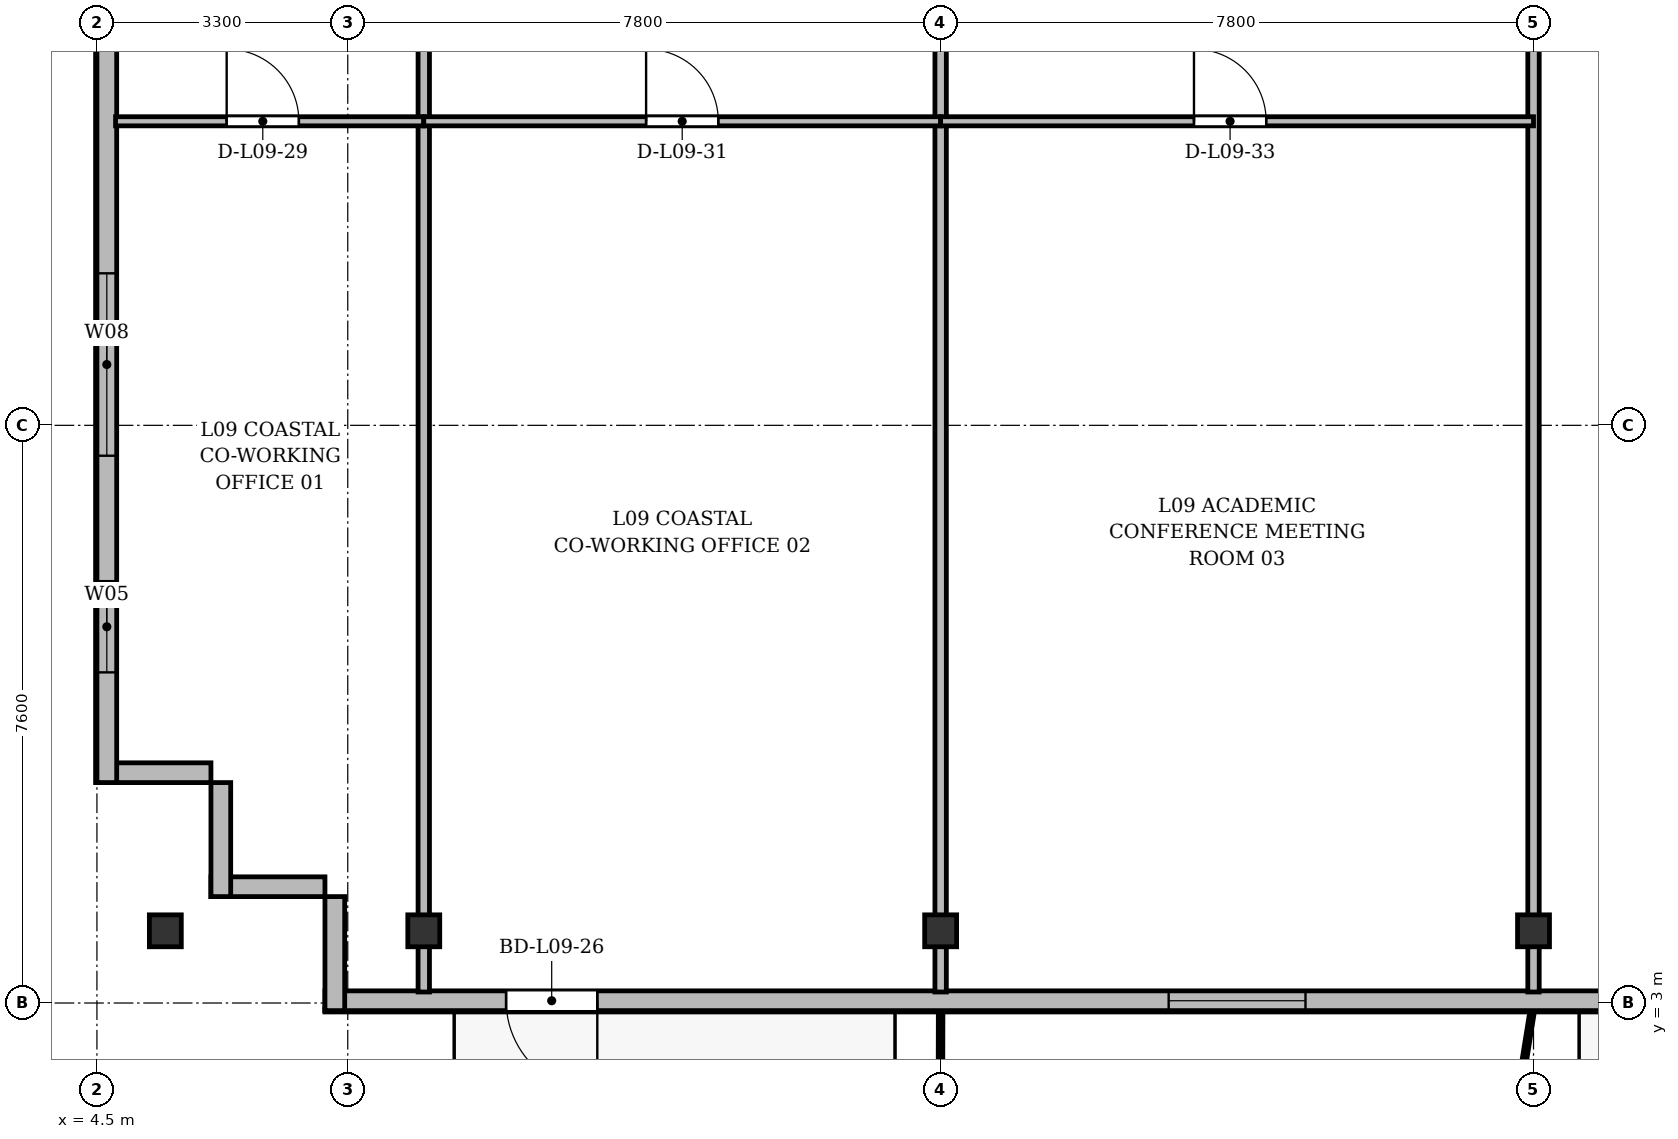
"""IFC4 building model, lengths in metres.
Left out: names, types, materials, properties, quantities, classifications, styles, units other than length and angle.
Written with IfcOpenShell. Run it as: python <this file> out.ifc"""

import sys

from ifc_helpers import new_model, si_unit, direction, frame, frame_2d, origin, origin_2d, place, context, subcontext, project, spatial, rectangle, i_section, extrude, source, transform, mapped, element, fill, save


model = new_model("IFC4")
c1 = context("Model", 3, precision=1e-05, world=origin(), true_north=direction((0.0, 1.0)))
c2 = subcontext(c1, "Body", "Model", "MODEL_VIEW")
j1 = project(units=[si_unit("LENGTHUNIT", "METRE"), si_unit("PLANEANGLEUNIT", "RADIAN")], contexts=[c1])
p1 = place(None, origin())
s1 = spatial("IfcSite", under=j1, at=p1, CompositionType="ELEMENT")
p2 = place(p1, origin())
s2 = spatial("IfcBuilding", under=s1, at=p2, CompositionType="ELEMENT")
p3 = place(p2, frame((0.0, 0.0, 37.9)))
s3 = spatial("IfcBuildingStorey", under=s2, at=p3, CompositionType="ELEMENT", Elevation=37.9)
m1 = source(origin(), c2, "Body", "SweptSolid", [
    extrude(i_section(OverallWidth=0.42, OverallDepth=0.42, WebThickness=0.026, FlangeThickness=0.04, at=origin_2d()), origin(), (0.0, 0.0, 1.0), 3.6),
])
for number, where, z_axis, x_axis in (
    (1, (5.4, 3.95, 0.0), (0.0, 0.0, 1.0), (1.0, 0.0, 0.0)),
    (2, (8.8, 3.95, 0.0), (0.0, 0.0, 1.0), (1.0, 0.0, 0.0)),
    (3, (15.6, 3.95, 0.0), (0.0, 0.0, 1.0), (1.0, 0.0, 0.0)),
    (4, (23.4, 3.95, 0.0), (0.0, 0.0, 1.0), (1.0, 0.0, 0.0)),
):
    element("IfcColumn", number, at=place(p3, frame(where, z_axis=z_axis, x_axis=x_axis)), inside=s3, PredefinedType="COLUMN", context=c2, shape_type="MappedRepresentation", body=[
        mapped(m1, transform((0.0, 0.0, 0.0), x_axis=(1.0, 0.0, 0.0), y_axis=(0.0, 1.0, 0.0), z_axis=(0.0, 0.0, 1.0), scale=1.0)),
    ])
for number, where, z_axis, x_axis in (
    (5, (7.5, 4.53, 0.0), (0.0, 0.0, 1.0), (-1.0, 0.0, 0.0)),
    (6, (6.13, 4.4, 0.0), (0.0, 0.0, 1.0), (0.0, 1.0, 0.0)),
):
    element("IfcWall", number, at=place(p3, frame(where, z_axis=z_axis, x_axis=x_axis)), inside=s3, PredefinedType="SOLIDWALL", context=c2, shape_type="SweptSolid", body=[
        extrude(rectangle(XDim=1.5, YDim=0.26, at=frame_2d((0.75, 0.0))), origin(), (0.0, 0.0, 1.0), 3.34),
    ])
p4 = place(p3, frame((6.0, 6.03, 0.0), z_axis=(0.0, 0.0, 1.0), x_axis=(-1.0, 0.0, 0.0)))
e7 = element("IfcWall", 7, at=p4, inside=s3, PredefinedType="SOLIDWALL", context=c2, shape_type="SweptSolid", body=[
    extrude(rectangle(XDim=1.5, YDim=0.26, at=frame_2d((0.75, 0.0))), origin(), (0.0, 0.0, 1.0), 2.752),
])
p5 = place(p3, frame((4.63, 5.9, 0.0), z_axis=(0.0, 0.0, 1.0), x_axis=(0.0, 1.0, 0.0)))
e8 = element("IfcWall", 8, at=p5, inside=s3, PredefinedType="SOLIDWALL", context=c2, shape_type="SweptSolid", body=[
    extrude(rectangle(XDim=39.6, YDim=0.26, at=frame_2d((19.8, 0.0))), origin(), (0.0, 0.0, 1.0), 3.34),
])
p6 = place(p5, frame((1.45, 0.0, 0.92)))
e9 = element("IfcOpeningElement", 9, at=p6, cuts=e8, PredefinedType="OPENING", context=c2, shape_type="SweptSolid", body=[
    extrude(rectangle(XDim=1.2, YDim=1.65, at=frame_2d((0.6, 0.825))), frame((0.0, 0.14, 0.0), z_axis=(0.0, -1.0, 0.0), x_axis=(1.0, 0.0, 0.0)), (0.0, 0.0, 1.0), 0.28),
])
p7 = place(p5, frame((4.3, 0.0, 0.92)))
e10 = element("IfcOpeningElement", 10, at=p7, cuts=e8, PredefinedType="OPENING", context=c2, shape_type="SweptSolid", body=[
    extrude(rectangle(XDim=2.4, YDim=2.1, at=frame_2d((1.2, 1.05))), frame((0.0, 0.14, 0.0), z_axis=(0.0, -1.0, 0.0), x_axis=(1.0, 0.0, 0.0)), (0.0, 0.0, 1.0), 0.28),
])
p8 = place(p5, frame((15.7, 0.0, 0.92)))
e11 = element("IfcOpeningElement", 11, at=p8, cuts=e8, PredefinedType="OPENING", context=c2, shape_type="SweptSolid", body=[
    extrude(rectangle(XDim=2.4, YDim=2.1, at=frame_2d((1.2, 1.05))), frame((0.0, 0.14, 0.0), z_axis=(0.0, -1.0, 0.0), x_axis=(1.0, 0.0, 0.0)), (0.0, 0.0, 1.0), 0.28),
])
p9 = place(p5, frame((29.7, 0.0, 0.92)))
e12 = element("IfcOpeningElement", 12, at=p9, cuts=e8, PredefinedType="OPENING", context=c2, shape_type="SweptSolid", body=[
    extrude(rectangle(XDim=2.4, YDim=2.1, at=frame_2d((1.2, 1.05))), frame((0.0, 0.14, 0.0), z_axis=(0.0, -1.0, 0.0), x_axis=(1.0, 0.0, 0.0)), (0.0, 0.0, 1.0), 0.28),
])
p10 = place(p5, frame((33.9, 0.0, 0.92)))
e13 = element("IfcOpeningElement", 13, at=p10, cuts=e8, PredefinedType="OPENING", context=c2, shape_type="SweptSolid", body=[
    extrude(rectangle(XDim=1.2, YDim=1.65, at=frame_2d((0.6, 0.825))), frame((0.0, 0.14, 0.0), z_axis=(0.0, -1.0, 0.0), x_axis=(1.0, 0.0, 0.0)), (0.0, 0.0, 1.0), 0.28),
])
p11 = place(p5, frame((37.25, 0.0, 0.92)))
e14 = element("IfcOpeningElement", 14, at=p11, cuts=e8, PredefinedType="OPENING", context=c2, shape_type="SweptSolid", body=[
    extrude(rectangle(XDim=1.2, YDim=1.65, at=frame_2d((0.6, 0.825))), frame((0.0, 0.14, 0.0), z_axis=(0.0, -1.0, 0.0), x_axis=(1.0, 0.0, 0.0)), (0.0, 0.0, 1.0), 0.28),
])
p12 = place(p3, frame((66.9, 3.03, 0.0), z_axis=(0.0, 0.0, 1.0), x_axis=(-1.0, 0.0, 0.0)))
e15 = element("IfcWall", 15, at=p12, inside=s3, PredefinedType="SOLIDWALL", context=c2, shape_type="SweptSolid", body=[
    extrude(rectangle(XDim=59.4, YDim=0.26, at=frame_2d((29.7, 0.0))), origin(), (0.0, 0.0, 1.0), 3.34),
])
p13 = place(p12, frame((3.8, 0.0, 0.9)))
e16 = element("IfcOpeningElement", 16, at=p13, cuts=e15, PredefinedType="OPENING", context=c2, shape_type="SweptSolid", body=[
    extrude(rectangle(XDim=1.8, YDim=1.8, at=frame_2d((0.9, 0.9))), frame((0.0, 0.14, 0.0), z_axis=(0.0, -1.0, 0.0), x_axis=(1.0, 0.0, 0.0)), (0.0, 0.0, 1.0), 0.28),
])
p14 = place(p12, frame((9.565, 0.0, 0.0)))
e17 = element("IfcOpeningElement", 17, at=p14, cuts=e15, PredefinedType="OPENING", context=c2, shape_type="SweptSolid", body=[
    extrude(rectangle(XDim=1.2, YDim=2.2, at=frame_2d((0.6, 1.1))), frame((0.0, 0.14, 0.0), z_axis=(0.0, -1.0, 0.0), x_axis=(1.0, 0.0, 0.0)), (0.0, 0.0, 1.0), 0.28),
])
p15 = place(p12, frame((18.75, 0.0, 0.9)))
e18 = element("IfcOpeningElement", 18, at=p15, cuts=e15, PredefinedType="OPENING", context=c2, shape_type="SweptSolid", body=[
    extrude(rectangle(XDim=1.5, YDim=1.75, at=frame_2d((0.75, 0.875))), frame((0.0, 0.14, 0.0), z_axis=(0.0, -1.0, 0.0), x_axis=(1.0, 0.0, 0.0)), (0.0, 0.0, 1.0), 0.28),
])
p16 = place(p12, frame((28.7, 0.0, 0.9)))
e19 = element("IfcOpeningElement", 19, at=p16, cuts=e15, PredefinedType="OPENING", context=c2, shape_type="SweptSolid", body=[
    extrude(rectangle(XDim=2.0, YDim=1.95, at=frame_2d((1.0, 0.975))), frame((0.0, 0.14, 0.0), z_axis=(0.0, -1.0, 0.0), x_axis=(1.0, 0.0, 0.0)), (0.0, 0.0, 1.0), 0.28),
])
p17 = place(p12, frame((40.301, 0.0, 0.0)))
e20 = element("IfcOpeningElement", 20, at=p17, cuts=e15, PredefinedType="OPENING", context=c2, shape_type="SweptSolid", body=[
    extrude(rectangle(XDim=1.2, YDim=2.2, at=frame_2d((0.6, 1.1))), frame((0.0, 0.14, 0.0), z_axis=(0.0, -1.0, 0.0), x_axis=(1.0, 0.0, 0.0)), (0.0, 0.0, 1.0), 0.28),
])
p18 = place(p12, frame((46.5, 0.0, 0.9)))
e21 = element("IfcOpeningElement", 21, at=p18, cuts=e15, PredefinedType="OPENING", context=c2, shape_type="SweptSolid", body=[
    extrude(rectangle(XDim=1.8, YDim=1.8, at=frame_2d((0.9, 0.9))), frame((0.0, 0.14, 0.0), z_axis=(0.0, -1.0, 0.0), x_axis=(1.0, 0.0, 0.0)), (0.0, 0.0, 1.0), 0.28),
])
p19 = place(p12, frame((55.817, 0.0, 0.0)))
e22 = element("IfcOpeningElement", 22, at=p19, cuts=e15, PredefinedType="OPENING", context=c2, shape_type="SweptSolid", body=[
    extrude(rectangle(XDim=1.2, YDim=2.2, at=frame_2d((0.6, 1.1))), frame((0.0, 0.14, 0.0), z_axis=(0.0, -1.0, 0.0), x_axis=(1.0, 0.0, 0.0)), (0.0, 0.0, 1.0), 0.28),
])
p20 = place(p3, frame((7.63, 2.9, 0.0), z_axis=(0.0, 0.0, 1.0), x_axis=(0.0, 1.0, 0.0)))
e23 = element("IfcWall", 23, at=p20, inside=s3, PredefinedType="SOLIDWALL", context=c2, shape_type="SweptSolid", body=[
    extrude(rectangle(XDim=1.5, YDim=0.26, at=frame_2d((0.75, 0.0))), origin(), (0.0, 0.0, 1.0), 2.69),
])
for number, where, z_axis, x_axis in (
    (24, (8.8, 3.145, 0.0), (0.0, 0.0, 1.0), (0.0, 1.0, 0.0)),
    (25, (15.6, 3.145, 0.0), (0.0, 0.0, 1.0), (0.0, 1.0, 0.0)),
    (26, (23.4, 3.145, 0.0), (0.0, 0.0, 1.0), (0.0, 1.0, 0.0)),
):
    element("IfcWall", number, at=place(p3, frame(where, z_axis=z_axis, x_axis=x_axis)), inside=s3, PredefinedType="PARTITIONING", context=c2, shape_type="SweptSolid", body=[
        extrude(rectangle(XDim=24.455, YDim=0.15, at=frame_2d((12.228, 0.0))), origin(), (0.0, 0.0, 1.0), 2.752),
    ])
p21 = place(p3, frame((4.745, 14.6, 0.0), z_axis=(0.0, 0.0, 1.0), x_axis=(1.0, 0.0, 0.0)))
e27 = element("IfcWall", 27, at=p21, inside=s3, PredefinedType="PARTITIONING", context=c2, shape_type="SweptSolid", body=[
    extrude(rectangle(XDim=4.055, YDim=0.12, at=frame_2d((2.027, 0.0))), origin(), (0.0, 0.0, 1.0), 2.752),
])
p22 = place(p21, frame((1.462, 0.0, 0.0)))
e28 = element("IfcOpeningElement", 28, at=p22, cuts=e27, PredefinedType="OPENING", context=c2, shape_type="SweptSolid", body=[
    extrude(rectangle(XDim=0.95, YDim=2.15, at=frame_2d((0.475, 1.075))), frame((0.0, 0.07, 0.0), z_axis=(0.0, -1.0, 0.0), x_axis=(1.0, 0.0, 0.0)), (0.0, 0.0, 1.0), 0.14),
])
p23 = place(p3, frame((8.8, 14.6, 0.0), z_axis=(0.0, 0.0, 1.0), x_axis=(1.0, 0.0, 0.0)))
e29 = element("IfcWall", 29, at=p23, inside=s3, PredefinedType="PARTITIONING", context=c2, shape_type="SweptSolid", body=[
    extrude(rectangle(XDim=6.8, YDim=0.12, at=frame_2d((3.4, 0.0))), origin(), (0.0, 0.0, 1.0), 2.752),
])
p24 = place(p23, frame((2.925, 0.0, 0.0)))
e30 = element("IfcOpeningElement", 30, at=p24, cuts=e29, PredefinedType="OPENING", context=c2, shape_type="SweptSolid", body=[
    extrude(rectangle(XDim=0.95, YDim=2.15, at=frame_2d((0.475, 1.075))), frame((0.0, 0.07, 0.0), z_axis=(0.0, -1.0, 0.0), x_axis=(1.0, 0.0, 0.0)), (0.0, 0.0, 1.0), 0.14),
])
p25 = place(p3, frame((15.6, 14.6, 0.0), z_axis=(0.0, 0.0, 1.0), x_axis=(1.0, 0.0, 0.0)))
e31 = element("IfcWall", 31, at=p25, inside=s3, PredefinedType="PARTITIONING", context=c2, shape_type="SweptSolid", body=[
    extrude(rectangle(XDim=7.8, YDim=0.12, at=frame_2d((3.9, 0.0))), origin(), (0.0, 0.0, 1.0), 2.752),
])
p26 = place(p25, frame((3.333, 0.0, 0.0)))
e32 = element("IfcOpeningElement", 32, at=p26, cuts=e31, PredefinedType="OPENING", context=c2, shape_type="SweptSolid", body=[
    extrude(rectangle(XDim=0.95, YDim=2.15, at=frame_2d((0.475, 1.075))), frame((0.0, 0.07, 0.0), z_axis=(0.0, -1.0, 0.0), x_axis=(1.0, 0.0, 0.0)), (0.0, 0.0, 1.0), 0.14),
])
m2 = source(origin(), c2, "Body", "SweptSolid", [
    extrude(rectangle(XDim=1.2, YDim=1.65, at=frame_2d((0.6, 0.825))), frame((0.0, 0.03, 0.0), z_axis=(0.0, -1.0, 0.0), x_axis=(1.0, 0.0, 0.0)), (0.0, 0.0, 1.0), 0.06),
])
p27 = place(p6, origin())
e33 = element("IfcWindow", 33, at=p27, inside=s3, PartitioningType="SINGLE_PANEL", PredefinedType="WINDOW", context=c2, shape_type="MappedRepresentation", body=[
    mapped(m2, transform((0.0, 0.0, 0.0), x_axis=(1.0, 0.0, 0.0), y_axis=(0.0, 1.0, 0.0), z_axis=(0.0, 0.0, 1.0), scale=1.0)),
])
fill(e9, e33)
m3 = source(origin(), c2, "Body", "SweptSolid", [
    extrude(rectangle(XDim=2.4, YDim=2.1, at=frame_2d((1.2, 1.05))), frame((0.0, 0.03, 0.0), z_axis=(0.0, -1.0, 0.0), x_axis=(1.0, 0.0, 0.0)), (0.0, 0.0, 1.0), 0.06),
])
p28 = place(p7, origin())
e34 = element("IfcWindow", 34, at=p28, inside=s3, PartitioningType="SINGLE_PANEL", PredefinedType="WINDOW", context=c2, shape_type="MappedRepresentation", body=[
    mapped(m3, transform((0.0, 0.0, 0.0), x_axis=(1.0, 0.0, 0.0), y_axis=(0.0, 1.0, 0.0), z_axis=(0.0, 0.0, 1.0), scale=1.0)),
])
fill(e10, e34)
m4 = source(origin(), c2, "Body", "SweptSolid", [
    extrude(rectangle(XDim=1.8, YDim=1.8, at=frame_2d((0.9, 0.9))), frame((0.0, 0.03, 0.0), z_axis=(0.0, -1.0, 0.0), x_axis=(1.0, 0.0, 0.0)), (0.0, 0.0, 1.0), 0.06),
])
p29 = place(p18, origin())
e35 = element("IfcWindow", 35, at=p29, inside=s3, PartitioningType="SINGLE_PANEL", PredefinedType="WINDOW", context=c2, shape_type="MappedRepresentation", body=[
    mapped(m4, transform((0.0, 0.0, 0.0), x_axis=(1.0, 0.0, 0.0), y_axis=(0.0, 1.0, 0.0), z_axis=(0.0, 0.0, 1.0), scale=1.0)),
])
fill(e21, e35)
m5 = source(origin(), c2, "Body", "SweptSolid", [
    extrude(rectangle(XDim=1.2, YDim=2.2, at=frame_2d((0.6, 1.1))), frame((0.0, 0.025, 0.0), z_axis=(0.0, -1.0, 0.0), x_axis=(1.0, 0.0, 0.0)), (0.0, 0.0, 1.0), 0.05),
])
p30 = place(p19, origin())
e36 = element("IfcDoor", 36, at=p30, inside=s3, OperationType="SINGLE_SWING_LEFT", PredefinedType="DOOR", context=c2, shape_type="MappedRepresentation", body=[
    mapped(m5, transform((0.0, 0.0, 0.0), x_axis=(1.0, 0.0, 0.0), y_axis=(0.0, 1.0, 0.0), z_axis=(0.0, 0.0, 1.0), scale=1.0)),
])
fill(e22, e36)
m6 = source(origin(), c2, "Body", "SweptSolid", [
    extrude(rectangle(XDim=0.95, YDim=2.15, at=frame_2d((0.475, 1.075))), frame((0.0, 0.025, 0.0), z_axis=(0.0, -1.0, 0.0), x_axis=(1.0, 0.0, 0.0)), (0.0, 0.0, 1.0), 0.05),
])
p31 = place(p22, origin())
e37 = element("IfcDoor", 37, at=p31, inside=s3, OperationType="SINGLE_SWING_LEFT", PredefinedType="DOOR", context=c2, shape_type="MappedRepresentation", body=[
    mapped(m6, transform((0.0, 0.0, 0.0), x_axis=(1.0, 0.0, 0.0), y_axis=(0.0, 1.0, 0.0), z_axis=(0.0, 0.0, 1.0), scale=1.0)),
])
fill(e28, e37)
p32 = place(p24, origin())
e38 = element("IfcDoor", 38, at=p32, inside=s3, OperationType="SINGLE_SWING_LEFT", PredefinedType="DOOR", context=c2, shape_type="MappedRepresentation", body=[
    mapped(m6, transform((0.0, 0.0, 0.0), x_axis=(1.0, 0.0, 0.0), y_axis=(0.0, 1.0, 0.0), z_axis=(0.0, 0.0, 1.0), scale=1.0)),
])
fill(e30, e38)
p33 = place(p26, origin())
e39 = element("IfcDoor", 39, at=p33, inside=s3, OperationType="SINGLE_SWING_LEFT", PredefinedType="DOOR", context=c2, shape_type="MappedRepresentation", body=[
    mapped(m6, transform((0.0, 0.0, 0.0), x_axis=(1.0, 0.0, 0.0), y_axis=(0.0, 1.0, 0.0), z_axis=(0.0, 0.0, 1.0), scale=1.0)),
])
fill(e32, e39)
save(model, sys.argv[1])
